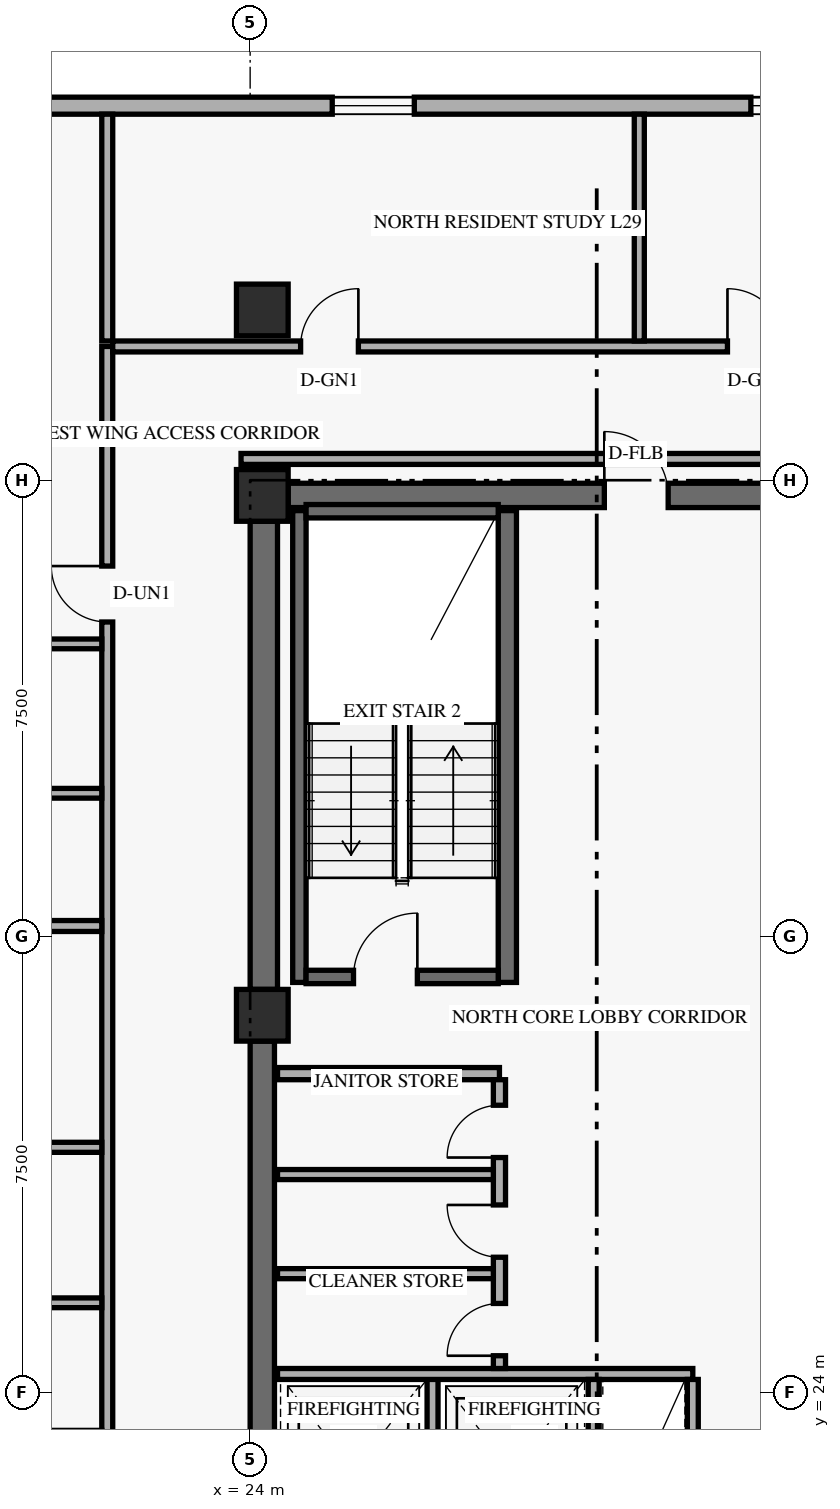
"""IFC4 building model, lengths in metres.
Left out: names, types, materials, properties, quantities, classifications, styles, units other than length and angle.
Written with IfcOpenShell. Run it as: python <this file> out.ifc"""

import sys

from ifc_helpers import new_model, si_unit, direction, frame, frame_2d, origin, origin_2d, place, context, subcontext, project, spatial, rectangle, extrude, element, fill, save


model = new_model("IFC4")
c1 = context("Model", 3, precision=1e-05, world=origin(), true_north=direction((0.0, 1.0)))
c2 = subcontext(c1, "Body", "Model", "MODEL_VIEW")
j1 = project(units=[si_unit("LENGTHUNIT", "METRE"), si_unit("PLANEANGLEUNIT", "RADIAN")], contexts=[c1])
p1 = place(None, origin())
s1 = spatial("IfcSite", under=j1, at=p1, CompositionType="ELEMENT")
p2 = place(p1, origin())
s2 = spatial("IfcBuilding", under=s1, at=p2, CompositionType="ELEMENT")
p3 = place(p2, frame((0.0, 0.0, 113.4)))
s3 = spatial("IfcBuildingStorey", under=s2, at=p3, CompositionType="ELEMENT", Elevation=113.4)
p4 = place(p3, frame((24.2, 17.975, 0.0), z_axis=(0.0, 0.0, 1.0), x_axis=(0.0, 1.0, 0.0)))
e1 = element("IfcWall", 1, at=p4, inside=s3, PredefinedType="SHEAR", context=c2, shape_type="SweptSolid", body=[
    extrude(rectangle(XDim=11.8, YDim=0.4, at=frame_2d((5.9, 0.0))), origin(), (0.0, 0.0, 1.0), 2.739),
])
p5 = place(p3, frame((24.225, 30.625, 0.0), z_axis=(0.0, 0.0, 1.0), x_axis=(0.0, 1.0, 0.0)))
e2 = element("IfcWall", 2, at=p5, inside=s3, PredefinedType="SHEAR", context=c2, shape_type="SweptSolid", body=[
    extrude(rectangle(XDim=7.7, YDim=0.45, at=frame_2d((3.85, 0.0))), origin(), (0.0, 0.0, 1.0), 2.739),
])
p6 = place(p3, frame((24.625, 38.75, 0.0), z_axis=(0.0, 0.0, 1.0), x_axis=(1.0, 0.0, 0.0)))
e3 = element("IfcWall", 3, at=p6, inside=s3, PredefinedType="SHEAR", context=c2, shape_type="SweptSolid", body=[
    extrude(rectangle(XDim=10.15, YDim=0.4, at=frame_2d((5.075, 0.0))), origin(), (0.0, 0.0, 1.0), 3.35),
])
p7 = place(p6, frame((5.2, 0.0, 0.0)))
e4 = element("IfcOpeningElement", 4, at=p7, cuts=e3, PredefinedType="OPENING", context=c2, shape_type="SweptSolid", body=[
    extrude(rectangle(XDim=1.05, YDim=2.15, at=frame_2d((0.525, 1.075))), frame((0.0, 0.21, 0.0), z_axis=(0.0, -1.0, 0.0), x_axis=(1.0, 0.0, 0.0)), (0.0, 0.0, 1.0), 0.42),
])
p8 = place(p3, frame((24.81, 30.74, 0.0), z_axis=(0.0, 0.0, 1.0), x_axis=(0.0, 1.0, 0.0)))
e5 = element("IfcWall", 5, at=p8, inside=s3, PredefinedType="SHEAR", context=c2, shape_type="SweptSolid", body=[
    extrude(rectangle(XDim=7.76, YDim=0.22, at=frame_2d((3.88, 0.0))), origin(), (0.0, 0.0, 1.0), 3.35),
])
p9 = place(p3, frame((28.23, 30.74, 0.0), z_axis=(0.0, 0.0, 1.0), x_axis=(0.0, 1.0, 0.0)))
e6 = element("IfcWall", 6, at=p9, inside=s3, PredefinedType="SHEAR", context=c2, shape_type="SweptSolid", body=[
    extrude(rectangle(XDim=7.76, YDim=0.3, at=frame_2d((3.88, 0.0))), origin(), (0.0, 0.0, 1.0), 3.35),
])
p10 = place(p3, frame((24.92, 30.83, 0.0), z_axis=(0.0, 0.0, 1.0), x_axis=(1.0, 0.0, 0.0)))
e7 = element("IfcWall", 7, at=p10, inside=s3, PredefinedType="SHEAR", context=c2, shape_type="SweptSolid", body=[
    extrude(rectangle(XDim=3.16, YDim=0.22, at=frame_2d((1.58, 0.0))), origin(), (0.0, 0.0, 1.0), 3.35),
])
p11 = place(p10, frame((0.78, 0.0, 0.0)))
e8 = element("IfcOpeningElement", 8, at=p11, cuts=e7, PredefinedType="OPENING", context=c2, shape_type="SweptSolid", body=[
    extrude(rectangle(XDim=1.05, YDim=2.15, at=frame_2d((0.525, 1.075))), frame((0.0, 0.12, 0.0), z_axis=(0.0, -1.0, 0.0), x_axis=(1.0, 0.0, 0.0)), (0.0, 0.0, 1.0), 0.24),
])
p12 = place(p3, frame((24.92, 38.49, 0.0), z_axis=(0.0, 0.0, 1.0), x_axis=(1.0, 0.0, 0.0)))
e9 = element("IfcWall", 9, at=p12, inside=s3, PredefinedType="SHEAR", context=c2, shape_type="SweptSolid", body=[
    extrude(rectangle(XDim=3.16, YDim=0.22, at=frame_2d((1.58, 0.0))), origin(), (0.0, 0.0, 1.0), 3.35),
])
for number, where, z_axis, x_axis in (
    (10, (24.2, 30.2, 0.0), (0.0, 0.0, 1.0), (1.0, 0.0, 0.0)),
    (11, (24.2, 38.75, 0.0), (0.0, 0.0, 1.0), (1.0, 0.0, 0.0)),
    (12, (24.2, 41.8, 0.0), (0.0, 0.0, 1.0), (1.0, 0.0, 0.0)),
):
    element("IfcColumn", number, at=place(p3, frame(where, z_axis=z_axis, x_axis=x_axis)), inside=s3, PredefinedType="COLUMN", context=c2, shape_type="SweptSolid", body=[
        extrude(rectangle(XDim=0.85, YDim=0.85, at=origin_2d()), origin(), (0.0, 0.0, 1.0), 3.6),
    ])
p13 = place(p3, frame((49.98, 45.16, 0.0), z_axis=(0.0, 0.0, 1.0), x_axis=(-1.0, 0.0, 0.0)))
e13 = element("IfcWall", 13, at=p13, inside=s3, PredefinedType="SOLIDWALL", context=c2, shape_type="SweptSolid", body=[
    extrude(rectangle(XDim=36.56, YDim=0.28, at=frame_2d((18.28, 0.0))), origin(), (0.0, 0.0, 1.0), 3.35),
])
p14 = place(p13, frame((31.77, 0.0, 0.85)))
e14 = element("IfcOpeningElement", 14, at=p14, cuts=e13, PredefinedType="OPENING", context=c2, shape_type="SweptSolid", body=[
    extrude(rectangle(XDim=1.35, YDim=1.55, at=frame_2d((0.675, 0.775))), frame((0.0, 0.15, 0.0), z_axis=(0.0, -1.0, 0.0), x_axis=(1.0, 0.0, 0.0)), (0.0, 0.0, 1.0), 0.3),
])
p15 = place(p13, frame((23.28, 0.0, 0.85)))
e15 = element("IfcOpeningElement", 15, at=p15, cuts=e13, PredefinedType="OPENING", context=c2, shape_type="SweptSolid", body=[
    extrude(rectangle(XDim=1.35, YDim=1.55, at=frame_2d((0.675, 0.775))), frame((0.0, 0.15, 0.0), z_axis=(0.0, -1.0, 0.0), x_axis=(1.0, 0.0, 0.0)), (0.0, 0.0, 1.0), 0.3),
])
p16 = place(p13, frame((16.395, 0.0, 0.85)))
e16 = element("IfcOpeningElement", 16, at=p16, cuts=e13, PredefinedType="OPENING", context=c2, shape_type="SweptSolid", body=[
    extrude(rectangle(XDim=1.35, YDim=1.55, at=frame_2d((0.675, 0.775))), frame((0.0, 0.15, 0.0), z_axis=(0.0, -1.0, 0.0), x_axis=(1.0, 0.0, 0.0)), (0.0, 0.0, 1.0), 0.3),
])
p17 = place(p13, frame((10.79, 0.0, 0.85)))
e17 = element("IfcOpeningElement", 17, at=p17, cuts=e13, PredefinedType="OPENING", context=c2, shape_type="SweptSolid", body=[
    extrude(rectangle(XDim=1.35, YDim=1.55, at=frame_2d((0.675, 0.775))), frame((0.0, 0.15, 0.0), z_axis=(0.0, -1.0, 0.0), x_axis=(1.0, 0.0, 0.0)), (0.0, 0.0, 1.0), 0.3),
])
p18 = place(p13, frame((5.7, 0.0, 0.85)))
e18 = element("IfcOpeningElement", 18, at=p18, cuts=e13, PredefinedType="OPENING", context=c2, shape_type="SweptSolid", body=[
    extrude(rectangle(XDim=1.35, YDim=1.55, at=frame_2d((0.675, 0.775))), frame((0.0, 0.15, 0.0), z_axis=(0.0, -1.0, 0.0), x_axis=(1.0, 0.0, 0.0)), (0.0, 0.0, 1.0), 0.3),
])
p19 = place(p13, frame((2.88, 0.0, 0.85)))
e19 = element("IfcOpeningElement", 19, at=p19, cuts=e13, PredefinedType="OPENING", context=c2, shape_type="SweptSolid", body=[
    extrude(rectangle(XDim=1.2, YDim=1.5, at=frame_2d((0.6, 0.75))), frame((0.0, 0.15, 0.0), z_axis=(0.0, -1.0, 0.0), x_axis=(1.0, 0.0, 0.0)), (0.0, 0.0, 1.0), 0.3),
])
p20 = place(p13, frame((0.615, 0.0, 0.85)))
e20 = element("IfcOpeningElement", 20, at=p20, cuts=e13, PredefinedType="OPENING", context=c2, shape_type="SweptSolid", body=[
    extrude(rectangle(XDim=1.35, YDim=1.55, at=frame_2d((0.675, 0.775))), frame((0.0, 0.15, 0.0), z_axis=(0.0, -1.0, 0.0), x_axis=(1.0, 0.0, 0.0)), (0.0, 0.0, 1.0), 0.3),
])
p21 = place(p3, frame((27.0, 21.19, 0.0), z_axis=(0.0, 0.0, 1.0), x_axis=(0.0, 1.0, 0.0)))
e21 = element("IfcWall", 21, at=p21, inside=s3, PredefinedType="STANDARD", context=c2, shape_type="SweptSolid", body=[
    extrude(rectangle(XDim=3.11, YDim=0.18, at=frame_2d((1.555, 0.0))), origin(), (0.0, 0.0, 1.0), 3.35),
])
p22 = place(p3, frame((24.45, 24.3, 0.0), z_axis=(0.0, 0.0, 1.0), x_axis=(1.0, 0.0, 0.0)))
e22 = element("IfcWall", 22, at=p22, inside=s3, PredefinedType="STANDARD", context=c2, shape_type="SweptSolid", body=[
    extrude(rectangle(XDim=6.83, YDim=0.18, at=frame_2d((3.415, 0.0))), origin(), (0.0, 0.0, 1.0), 3.35),
])
for number, where, z_axis, x_axis in (
    (23, (29.65, 21.19, 0.0), (0.0, 0.0, 1.0), (0.0, 1.0, 0.0)),
    (24, (31.28, 21.19, 0.0), (0.0, 0.0, 1.0), (0.0, 1.0, 0.0)),
):
    element("IfcWall", number, at=place(p3, frame(where, z_axis=z_axis, x_axis=x_axis)), inside=s3, PredefinedType="STANDARD", context=c2, shape_type="SweptSolid", body=[
        extrude(rectangle(XDim=3.02, YDim=0.18, at=frame_2d((1.51, 0.0))), origin(), (0.0, 0.0, 1.0), 3.35),
    ])
p23 = place(p3, frame((24.45, 29.24, 0.0), z_axis=(0.0, 0.0, 1.0), x_axis=(1.0, 0.0, 0.0)))
e25 = element("IfcWall", 25, at=p23, inside=s3, PredefinedType="STANDARD", context=c2, shape_type="SweptSolid", body=[
    extrude(rectangle(XDim=3.65, YDim=0.2, at=frame_2d((1.825, 0.0))), origin(), (0.0, 0.0, 1.0), 3.35),
])
p24 = place(p3, frame((28.1, 24.39, 0.0), z_axis=(0.0, 0.0, 1.0), x_axis=(0.0, 1.0, 0.0)))
e26 = element("IfcWall", 26, at=p24, inside=s3, PredefinedType="STANDARD", context=c2, shape_type="SweptSolid", body=[
    extrude(rectangle(XDim=4.75, YDim=0.2, at=frame_2d((2.375, 0.0))), origin(), (0.0, 0.0, 1.0), 3.35),
])
p25 = place(p24, frame((0.21, 0.0, 0.0)))
e27 = element("IfcOpeningElement", 27, at=p25, cuts=e26, PredefinedType="OPENING", context=c2, shape_type="SweptSolid", body=[
    extrude(rectangle(XDim=0.86, YDim=2.1, at=frame_2d((0.43, 1.05))), frame((0.0, 0.11, 0.0), z_axis=(0.0, -1.0, 0.0), x_axis=(1.0, 0.0, 0.0)), (0.0, 0.0, 1.0), 0.22),
])
p26 = place(p24, frame((1.83, 0.0, 0.0)))
e28 = element("IfcOpeningElement", 28, at=p26, cuts=e26, PredefinedType="OPENING", context=c2, shape_type="SweptSolid", body=[
    extrude(rectangle(XDim=0.86, YDim=2.1, at=frame_2d((0.43, 1.05))), frame((0.0, 0.11, 0.0), z_axis=(0.0, -1.0, 0.0), x_axis=(1.0, 0.0, 0.0)), (0.0, 0.0, 1.0), 0.22),
])
p27 = place(p24, frame((3.47, 0.0, 0.0)))
e29 = element("IfcOpeningElement", 29, at=p27, cuts=e26, PredefinedType="OPENING", context=c2, shape_type="SweptSolid", body=[
    extrude(rectangle(XDim=0.86, YDim=2.1, at=frame_2d((0.43, 1.05))), frame((0.0, 0.11, 0.0), z_axis=(0.0, -1.0, 0.0), x_axis=(1.0, 0.0, 0.0)), (0.0, 0.0, 1.0), 0.22),
])
for number, where, z_axis, x_axis in (
    (30, (24.45, 25.95, 0.0), (0.0, 0.0, 1.0), (1.0, 0.0, 0.0)),
    (31, (24.45, 27.58, 0.0), (0.0, 0.0, 1.0), (1.0, 0.0, 0.0)),
):
    element("IfcWall", number, at=place(p3, frame(where, z_axis=z_axis, x_axis=x_axis)), inside=s3, PredefinedType="PARTITIONING", context=c2, shape_type="SweptSolid", body=[
        extrude(rectangle(XDim=3.55, YDim=0.165, at=frame_2d((1.775, 0.0))), origin(), (0.0, 0.0, 1.0), 3.35),
    ])
p28 = place(p3, frame((21.65, 6.8, 0.0), z_axis=(0.0, 0.0, 1.0), x_axis=(0.0, 1.0, 0.0)))
e32 = element("IfcWall", 32, at=p28, inside=s3, PredefinedType="STANDARD", context=c2, shape_type="SweptSolid", body=[
    extrude(rectangle(XDim=34.4, YDim=0.18, at=frame_2d((17.2, 0.0))), origin(), (0.0, 0.0, 1.0), 2.721),
])
p29 = place(p28, frame((4.444, 0.0, 0.0)))
e33 = element("IfcOpeningElement", 33, at=p29, cuts=e32, PredefinedType="OPENING", context=c2, shape_type="SweptSolid", body=[
    extrude(rectangle(XDim=0.92, YDim=2.15, at=frame_2d((0.46, 1.075))), frame((0.0, 0.1, 0.0), z_axis=(0.0, -1.0, 0.0), x_axis=(1.0, 0.0, 0.0)), (0.0, 0.0, 1.0), 0.2),
])
p30 = place(p28, frame((15.192, 0.0, 0.0)))
e34 = element("IfcOpeningElement", 34, at=p30, cuts=e32, PredefinedType="OPENING", context=c2, shape_type="SweptSolid", body=[
    extrude(rectangle(XDim=0.92, YDim=2.15, at=frame_2d((0.46, 1.075))), frame((0.0, 0.1, 0.0), z_axis=(0.0, -1.0, 0.0), x_axis=(1.0, 0.0, 0.0)), (0.0, 0.0, 1.0), 0.2),
])
p31 = place(p28, frame((29.868, 0.0, 0.0)))
e35 = element("IfcOpeningElement", 35, at=p31, cuts=e32, PredefinedType="OPENING", context=c2, shape_type="SweptSolid", body=[
    extrude(rectangle(XDim=0.92, YDim=2.15, at=frame_2d((0.46, 1.075))), frame((0.0, 0.1, 0.0), z_axis=(0.0, -1.0, 0.0), x_axis=(1.0, 0.0, 0.0)), (0.0, 0.0, 1.0), 0.2),
])
p32 = place(p3, frame((21.74, 41.2, 0.0), z_axis=(0.0, 0.0, 1.0), x_axis=(1.0, 0.0, 0.0)))
e36 = element("IfcWall", 36, at=p32, inside=s3, PredefinedType="STANDARD", context=c2, shape_type="SweptSolid", body=[
    extrude(rectangle(XDim=13.68, YDim=0.18, at=frame_2d((6.84, 0.0))), origin(), (0.0, 0.0, 1.0), 2.721),
])
p33 = place(p32, frame((3.09, 0.0, 0.0)))
e37 = element("IfcOpeningElement", 37, at=p33, cuts=e36, PredefinedType="OPENING", context=c2, shape_type="SweptSolid", body=[
    extrude(rectangle(XDim=0.95, YDim=2.15, at=frame_2d((0.475, 1.075))), frame((0.0, 0.1, 0.0), z_axis=(0.0, -1.0, 0.0), x_axis=(1.0, 0.0, 0.0)), (0.0, 0.0, 1.0), 0.2),
])
p34 = place(p32, frame((10.11, 0.0, 0.0)))
e38 = element("IfcOpeningElement", 38, at=p34, cuts=e36, PredefinedType="OPENING", context=c2, shape_type="SweptSolid", body=[
    extrude(rectangle(XDim=0.95, YDim=2.15, at=frame_2d((0.475, 1.075))), frame((0.0, 0.1, 0.0), z_axis=(0.0, -1.0, 0.0), x_axis=(1.0, 0.0, 0.0)), (0.0, 0.0, 1.0), 0.2),
])
p35 = place(p3, frame((23.85, 39.35, 0.0), z_axis=(0.0, 0.0, 1.0), x_axis=(1.0, 0.0, 0.0)))
e39 = element("IfcWall", 39, at=p35, inside=s3, PredefinedType="STANDARD", context=c2, shape_type="SweptSolid", body=[
    extrude(rectangle(XDim=11.57, YDim=0.18, at=frame_2d((5.785, 0.0))), origin(), (0.0, 0.0, 1.0), 2.721),
])
p36 = place(p3, frame((21.65, 41.29, 0.0), z_axis=(0.0, 0.0, 1.0), x_axis=(0.0, 1.0, 0.0)))
e40 = element("IfcWall", 40, at=p36, inside=s3, PredefinedType="PARTITIONING", context=c2, shape_type="SweptSolid", body=[
    extrude(rectangle(XDim=3.73, YDim=0.18, at=frame_2d((1.865, 0.0))), origin(), (0.0, 0.0, 1.0), 2.799),
])
p37 = place(p3, frame((10.08, 28.028, 0.0), z_axis=(0.0, 0.0, 1.0), x_axis=(1.0, 0.0, 0.0)))
e41 = element("IfcWall", 41, at=p37, inside=s3, PredefinedType="PARTITIONING", context=c2, shape_type="SweptSolid", body=[
    extrude(rectangle(XDim=11.48, YDim=0.165, at=frame_2d((5.74, 0.0))), origin(), (0.0, 0.0, 1.0), 2.721),
])
p38 = place(p37, frame((9.033, 0.0, 0.0)))
e42 = element("IfcOpeningElement", 42, at=p38, cuts=e41, PredefinedType="OPENING", context=c2, shape_type="SweptSolid", body=[
    extrude(rectangle(XDim=0.88, YDim=2.12, at=frame_2d((0.44, 1.06))), frame((0.0, 0.093, 0.0), z_axis=(0.0, -1.0, 0.0), x_axis=(1.0, 0.0, 0.0)), (0.0, 0.0, 1.0), 0.185),
])
p39 = place(p37, frame((2.568, 0.0, 0.0)))
e43 = element("IfcOpeningElement", 43, at=p39, cuts=e41, PredefinedType="OPENING", context=c2, shape_type="SweptSolid", body=[
    extrude(rectangle(XDim=0.9, YDim=2.14, at=frame_2d((0.45, 1.07))), frame((0.0, 0.093, 0.0), z_axis=(0.0, -1.0, 0.0), x_axis=(1.0, 0.0, 0.0)), (0.0, 0.0, 1.0), 0.185),
])
p40 = place(p3, frame((18.932, 25.471, 0.0), z_axis=(0.0, 0.0, 1.0), x_axis=(1.0, 0.0, 0.0)))
e44 = element("IfcWall", 44, at=p40, inside=s3, PredefinedType="PLUMBINGWALL", context=c2, shape_type="SweptSolid", body=[
    extrude(rectangle(XDim=2.628, YDim=0.16, at=frame_2d((1.314, 0.0))), origin(), (0.0, 0.0, 1.0), 3.35),
])
p41 = place(p3, frame((10.08, 31.668, 0.0), z_axis=(0.0, 0.0, 1.0), x_axis=(1.0, 0.0, 0.0)))
e45 = element("IfcWall", 45, at=p41, inside=s3, PredefinedType="PARTITIONING", context=c2, shape_type="SweptSolid", body=[
    extrude(rectangle(XDim=11.48, YDim=0.18, at=frame_2d((5.74, 0.0))), origin(), (0.0, 0.0, 1.0), 2.721),
])
p42 = place(p3, frame((18.726, 36.308, 0.0), z_axis=(0.0, 0.0, 1.0), x_axis=(1.0, 0.0, 0.0)))
e46 = element("IfcWall", 46, at=p42, inside=s3, PredefinedType="PLUMBINGWALL", context=c2, shape_type="SweptSolid", body=[
    extrude(rectangle(XDim=2.834, YDim=0.16, at=frame_2d((1.417, 0.0))), origin(), (0.0, 0.0, 1.0), 3.35),
])
p43 = place(p3, frame((18.886, 33.851, 0.0), z_axis=(0.0, 0.0, 1.0), x_axis=(1.0, 0.0, 0.0)))
e47 = element("IfcWall", 47, at=p43, inside=s3, PredefinedType="PLUMBINGWALL", context=c2, shape_type="SweptSolid", body=[
    extrude(rectangle(XDim=2.674, YDim=0.16, at=frame_2d((1.337, 0.0))), origin(), (0.0, 0.0, 1.0), 3.35),
])
p44 = place(p3, frame((30.4, 41.29, 0.0), z_axis=(0.0, 0.0, 1.0), x_axis=(0.0, 1.0, 0.0)))
e48 = element("IfcWall", 48, at=p44, inside=s3, PredefinedType="PARTITIONING", context=c2, shape_type="SweptSolid", body=[
    extrude(rectangle(XDim=3.73, YDim=0.165, at=frame_2d((1.865, 0.0))), origin(), (0.0, 0.0, 1.0), 2.799),
])
p45 = place(p15, origin())
e49 = element("IfcWindow", 49, at=p45, inside=s3, PartitioningType="SINGLE_PANEL", PredefinedType="WINDOW", context=c2, shape_type="SweptSolid", body=[
    extrude(rectangle(XDim=1.35, YDim=1.55, at=frame_2d((0.675, 0.775))), frame((0.0, 0.03, 0.0), z_axis=(0.0, -1.0, 0.0), x_axis=(1.0, 0.0, 0.0)), (0.0, 0.0, 1.0), 0.06),
])
fill(e15, e49)
p46 = place(p16, origin())
e50 = element("IfcWindow", 50, at=p46, inside=s3, PartitioningType="SINGLE_PANEL", PredefinedType="WINDOW", context=c2, shape_type="SweptSolid", body=[
    extrude(rectangle(XDim=1.35, YDim=1.55, at=frame_2d((0.675, 0.775))), frame((0.0, 0.03, 0.0), z_axis=(0.0, -1.0, 0.0), x_axis=(1.0, 0.0, 0.0)), (0.0, 0.0, 1.0), 0.06),
])
fill(e16, e50)
p47 = place(p11, origin())
e51 = element("IfcDoor", 51, at=p47, inside=s3, OperationType="SINGLE_SWING_RIGHT", PredefinedType="DOOR", context=c2, shape_type="SweptSolid", body=[
    extrude(rectangle(XDim=1.05, YDim=2.15, at=frame_2d((0.525, 1.075))), frame((0.0, 0.025, 0.0), z_axis=(0.0, -1.0, 0.0), x_axis=(1.0, 0.0, 0.0)), (0.0, 0.0, 1.0), 0.05),
])
fill(e8, e51)
p48 = place(p25, origin())
e52 = element("IfcDoor", 52, at=p48, inside=s3, OperationType="SINGLE_SWING_LEFT", PredefinedType="DOOR", context=c2, shape_type="SweptSolid", body=[
    extrude(rectangle(XDim=0.86, YDim=2.1, at=frame_2d((0.43, 1.05))), frame((0.0, 0.025, 0.0), z_axis=(0.0, -1.0, 0.0), x_axis=(1.0, 0.0, 0.0)), (0.0, 0.0, 1.0), 0.05),
])
fill(e27, e52)
p49 = place(p26, origin())
e53 = element("IfcDoor", 53, at=p49, inside=s3, OperationType="SINGLE_SWING_RIGHT", PredefinedType="DOOR", context=c2, shape_type="SweptSolid", body=[
    extrude(rectangle(XDim=0.86, YDim=2.1, at=frame_2d((0.43, 1.05))), frame((0.0, 0.025, 0.0), z_axis=(0.0, -1.0, 0.0), x_axis=(1.0, 0.0, 0.0)), (0.0, 0.0, 1.0), 0.05),
])
fill(e28, e53)
p50 = place(p27, origin())
e54 = element("IfcDoor", 54, at=p50, inside=s3, OperationType="SINGLE_SWING_LEFT", PredefinedType="DOOR", context=c2, shape_type="SweptSolid", body=[
    extrude(rectangle(XDim=0.86, YDim=2.1, at=frame_2d((0.43, 1.05))), frame((0.0, 0.025, 0.0), z_axis=(0.0, -1.0, 0.0), x_axis=(1.0, 0.0, 0.0)), (0.0, 0.0, 1.0), 0.05),
])
fill(e29, e54)
p51 = place(p7, frame((1.05, 0.0, 0.0), z_axis=(0.0, 0.0, 1.0), x_axis=(-1.0, 0.0, 0.0)))
e55 = element("IfcDoor", 55, at=p51, inside=s3, OperationType="SINGLE_SWING_RIGHT", PredefinedType="DOOR", context=c2, shape_type="SweptSolid", body=[
    extrude(rectangle(XDim=1.05, YDim=2.15, at=frame_2d((0.525, 1.075))), frame((0.0, 0.025, 0.0), z_axis=(0.0, -1.0, 0.0), x_axis=(1.0, 0.0, 0.0)), (0.0, 0.0, 1.0), 0.05),
])
fill(e4, e55)
p52 = place(p31, origin())
e56 = element("IfcDoor", 56, at=p52, inside=s3, OperationType="SINGLE_SWING_RIGHT", PredefinedType="DOOR", context=c2, shape_type="SweptSolid", body=[
    extrude(rectangle(XDim=0.92, YDim=2.15, at=frame_2d((0.46, 1.075))), frame((0.0, 0.025, 0.0), z_axis=(0.0, -1.0, 0.0), x_axis=(1.0, 0.0, 0.0)), (0.0, 0.0, 1.0), 0.05),
])
fill(e35, e56)
p53 = place(p33, origin())
e57 = element("IfcDoor", 57, at=p53, inside=s3, OperationType="SINGLE_SWING_RIGHT", PredefinedType="DOOR", context=c2, shape_type="SweptSolid", body=[
    extrude(rectangle(XDim=0.95, YDim=2.15, at=frame_2d((0.475, 1.075))), frame((0.0, 0.025, 0.0), z_axis=(0.0, -1.0, 0.0), x_axis=(1.0, 0.0, 0.0)), (0.0, 0.0, 1.0), 0.05),
])
fill(e37, e57)
p54 = place(p34, origin())
e58 = element("IfcDoor", 58, at=p54, inside=s3, OperationType="SINGLE_SWING_LEFT", PredefinedType="DOOR", context=c2, shape_type="SweptSolid", body=[
    extrude(rectangle(XDim=0.95, YDim=2.15, at=frame_2d((0.475, 1.075))), frame((0.0, 0.025, 0.0), z_axis=(0.0, -1.0, 0.0), x_axis=(1.0, 0.0, 0.0)), (0.0, 0.0, 1.0), 0.05),
])
fill(e38, e58)
save(model, sys.argv[1])
